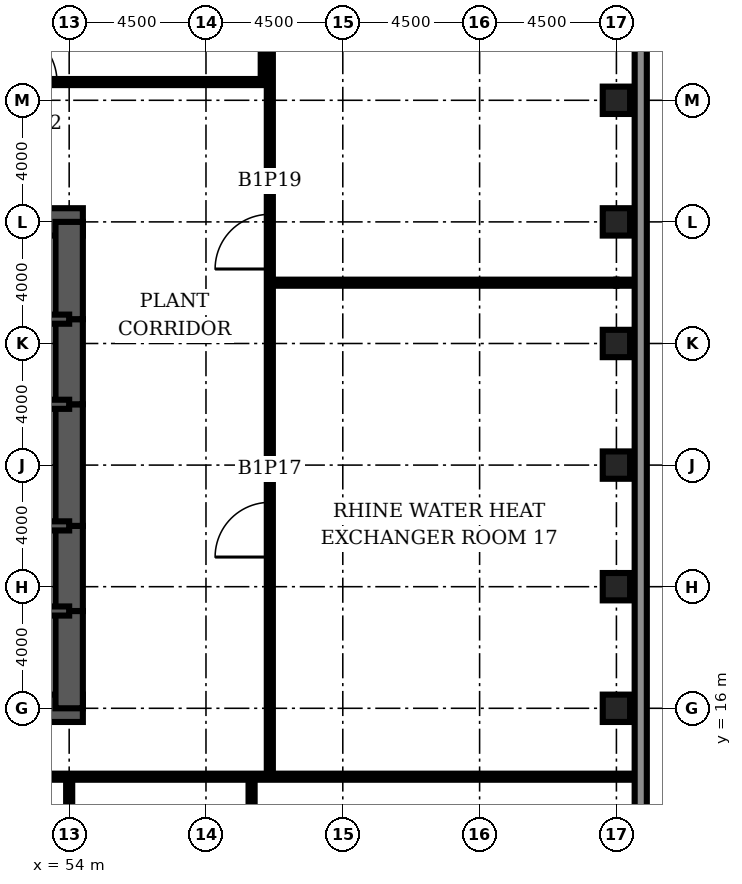
"""IFC4 building model, lengths in metres.
Left out: names, types, materials, properties, quantities, classifications, styles, units other than length and angle.
Written with IfcOpenShell. Run it as: python <this file> out.ifc"""

import sys

from ifc_helpers import new_model, si_unit, direction, frame, frame_2d, origin, origin_2d, place, context, subcontext, project, spatial, rectangle, hollow_rectangle, extrude, element, fill, save


model = new_model("IFC4")
c1 = context("Model", 3, precision=1e-05, world=origin(), true_north=direction((0.0, 1.0)))
c2 = subcontext(c1, "Body", "Model", "MODEL_VIEW")
j1 = project(units=[si_unit("LENGTHUNIT", "METRE"), si_unit("PLANEANGLEUNIT", "RADIAN")], contexts=[c1])
p1 = place(None, origin())
s1 = spatial("IfcSite", under=j1, at=p1, CompositionType="ELEMENT")
p2 = place(p1, origin())
s2 = spatial("IfcBuilding", under=s1, at=p2, CompositionType="ELEMENT")
p3 = place(p2, frame((0.0, 0.0, -6.0)))
s3 = spatial("IfcBuildingStorey", under=s2, at=p3, CompositionType="ELEMENT", Elevation=-6.0)
for number, where, z_axis, x_axis in (
    (1, (72.0, 16.0, 0.0), (0.0, 0.0, 1.0), (1.0, 0.0, 0.0)),
    (2, (72.0, 20.0, 0.0), (0.0, 0.0, 1.0), (1.0, 0.0, 0.0)),
    (3, (72.0, 24.0, 0.0), (0.0, 0.0, 1.0), (1.0, 0.0, 0.0)),
    (4, (72.0, 28.0, 0.0), (0.0, 0.0, 1.0), (1.0, 0.0, 0.0)),
    (5, (72.0, 32.0, 0.0), (0.0, 0.0, 1.0), (1.0, 0.0, 0.0)),
    (6, (72.0, 36.0, 0.0), (0.0, 0.0, 1.0), (1.0, 0.0, 0.0)),
):
    element("IfcColumn", number, at=place(p3, frame(where, z_axis=z_axis, x_axis=x_axis)), inside=s3, PredefinedType="COLUMN", context=c2, shape_type="SweptSolid", body=[
        extrude(hollow_rectangle(XDim=0.9, YDim=0.9, WallThickness=0.12, at=origin_2d()), origin(), (0.0, 0.0, 1.0), 6.0),
    ])
for number, where, z_axis, x_axis in (
    (7, (45.0, 16.0, 0.0), (0.0, 0.0, 1.0), (1.0, 0.0, 0.0)),
    (8, (54.45, 32.0, 0.0), (0.0, 0.0, 1.0), (-1.0, 0.0, 0.0)),
):
    element("IfcWall", number, at=place(p3, frame(where, z_axis=z_axis, x_axis=x_axis)), inside=s3, PredefinedType="SHEAR", context=c2, shape_type="SweptSolid", body=[
        extrude(rectangle(XDim=9.45, YDim=0.9, at=frame_2d((4.725, 0.0))), origin(), (0.0, 0.0, 1.0), 6.0),
    ])
p4 = place(p3, frame((54.0, 16.0, 0.0), z_axis=(0.0, 0.0, 1.0), x_axis=(0.0, 1.0, 0.0)))
e9 = element("IfcWall", 9, at=p4, inside=s3, PredefinedType="SHEAR", context=c2, shape_type="SweptSolid", body=[
    extrude(rectangle(XDim=3.2, YDim=0.9, at=frame_2d((1.6, 0.0))), origin(), (0.0, 0.0, 1.0), 6.0),
])
p5 = place(p3, frame((54.0, 19.2, 0.0), z_axis=(0.0, 0.0, 1.0), x_axis=(0.0, 1.0, 0.0)))
e10 = element("IfcWall", 10, at=p5, inside=s3, PredefinedType="SHEAR", context=c2, shape_type="SweptSolid", body=[
    extrude(rectangle(XDim=2.8, YDim=0.9, at=frame_2d((1.4, 0.0))), origin(), (0.0, 0.0, 1.0), 6.0),
])
p6 = place(p5, frame((0.4, 0.0, 0.0)))
e11 = element("IfcOpeningElement", 11, at=p6, cuts=e10, PredefinedType="OPENING", context=c2, shape_type="SweptSolid", body=[
    extrude(rectangle(XDim=1.8, YDim=2.1, at=frame_2d((0.9, 1.05))), frame((0.0, 0.46, 0.0), z_axis=(0.0, -1.0, 0.0), x_axis=(1.0, 0.0, 0.0)), (0.0, 0.0, 1.0), 0.92),
])
p7 = place(p3, frame((54.0, 22.0, 0.0), z_axis=(0.0, 0.0, 1.0), x_axis=(0.0, 1.0, 0.0)))
e12 = element("IfcWall", 12, at=p7, inside=s3, PredefinedType="SHEAR", context=c2, shape_type="SweptSolid", body=[
    extrude(rectangle(XDim=4.0, YDim=0.9, at=frame_2d((2.0, 0.0))), origin(), (0.0, 0.0, 1.0), 6.0),
])
p8 = place(p3, frame((54.0, 26.0, 0.0), z_axis=(0.0, 0.0, 1.0), x_axis=(0.0, 1.0, 0.0)))
e13 = element("IfcWall", 13, at=p8, inside=s3, PredefinedType="SHEAR", context=c2, shape_type="SweptSolid", body=[
    extrude(rectangle(XDim=2.8, YDim=0.9, at=frame_2d((1.4, 0.0))), origin(), (0.0, 0.0, 1.0), 6.0),
])
p9 = place(p8, frame((0.6, 0.0, 0.0)))
e14 = element("IfcOpeningElement", 14, at=p9, cuts=e13, PredefinedType="OPENING", context=c2, shape_type="SweptSolid", body=[
    extrude(rectangle(XDim=1.8, YDim=2.1, at=frame_2d((0.9, 1.05))), frame((0.0, 0.46, 0.0), z_axis=(0.0, -1.0, 0.0), x_axis=(1.0, 0.0, 0.0)), (0.0, 0.0, 1.0), 0.92),
])
p10 = place(p3, frame((54.0, 28.8, 0.0), z_axis=(0.0, 0.0, 1.0), x_axis=(0.0, 1.0, 0.0)))
e15 = element("IfcWall", 15, at=p10, inside=s3, PredefinedType="SHEAR", context=c2, shape_type="SweptSolid", body=[
    extrude(rectangle(XDim=3.2, YDim=0.9, at=frame_2d((1.6, 0.0))), origin(), (0.0, 0.0, 1.0), 6.0),
])
p11 = place(p3, frame((45.0, 19.2, 0.0), z_axis=(0.0, 0.0, 1.0), x_axis=(1.0, 0.0, 0.0)))
e16 = element("IfcWall", 16, at=p11, inside=s3, PredefinedType="SOLIDWALL", context=c2, shape_type="SweptSolid", body=[
    extrude(rectangle(XDim=9.0, YDim=0.3, at=frame_2d((4.5, 0.0))), origin(), (0.0, 0.0, 1.0), 6.0),
])
p12 = place(p11, frame((7.35, 0.0, 0.0)))
e17 = element("IfcOpeningElement", 17, at=p12, cuts=e16, PredefinedType="OPENING", context=c2, shape_type="SweptSolid", body=[
    extrude(rectangle(XDim=1.0, YDim=2.1, at=frame_2d((0.5, 1.05))), frame((0.0, 0.16, 0.0), z_axis=(0.0, -1.0, 0.0), x_axis=(1.0, 0.0, 0.0)), (0.0, 0.0, 1.0), 0.32),
])
p13 = place(p3, frame((45.0, 28.8, 0.0), z_axis=(0.0, 0.0, 1.0), x_axis=(1.0, 0.0, 0.0)))
e18 = element("IfcWall", 18, at=p13, inside=s3, PredefinedType="SOLIDWALL", context=c2, shape_type="SweptSolid", body=[
    extrude(rectangle(XDim=9.0, YDim=0.3, at=frame_2d((4.5, 0.0))), origin(), (0.0, 0.0, 1.0), 6.0),
])
p14 = place(p13, frame((7.35, 0.0, 0.0)))
e19 = element("IfcOpeningElement", 19, at=p14, cuts=e18, PredefinedType="OPENING", context=c2, shape_type="SweptSolid", body=[
    extrude(rectangle(XDim=1.0, YDim=2.1, at=frame_2d((0.5, 1.05))), frame((0.0, 0.16, 0.0), z_axis=(0.0, -1.0, 0.0), x_axis=(1.0, 0.0, 0.0)), (0.0, 0.0, 1.0), 0.32),
])
p15 = place(p3, frame((48.0, 22.0, 0.0), z_axis=(0.0, 0.0, 1.0), x_axis=(1.0, 0.0, 0.0)))
e20 = element("IfcWall", 20, at=p15, inside=s3, PredefinedType="SOLIDWALL", context=c2, shape_type="SweptSolid", body=[
    extrude(rectangle(XDim=6.0, YDim=0.3, at=frame_2d((3.0, 0.0))), origin(), (0.0, 0.0, 1.0), 6.0),
])
p16 = place(p15, frame((2.0, 0.0, 0.0)))
e21 = element("IfcOpeningElement", 21, at=p16, cuts=e20, PredefinedType="OPENING", context=c2, shape_type="SweptSolid", body=[
    extrude(rectangle(XDim=1.0, YDim=2.1, at=frame_2d((0.5, 1.05))), frame((0.0, 0.16, 0.0), z_axis=(0.0, -1.0, 0.0), x_axis=(1.0, 0.0, 0.0)), (0.0, 0.0, 1.0), 0.32),
])
p17 = place(p15, frame((4.3, 0.0, 0.0)))
e22 = element("IfcOpeningElement", 22, at=p17, cuts=e20, PredefinedType="OPENING", context=c2, shape_type="SweptSolid", body=[
    extrude(rectangle(XDim=1.0, YDim=2.1, at=frame_2d((0.5, 1.05))), frame((0.0, 0.16, 0.0), z_axis=(0.0, -1.0, 0.0), x_axis=(1.0, 0.0, 0.0)), (0.0, 0.0, 1.0), 0.32),
])
p18 = place(p3, frame((48.0, 26.0, 0.0), z_axis=(0.0, 0.0, 1.0), x_axis=(1.0, 0.0, 0.0)))
e23 = element("IfcWall", 23, at=p18, inside=s3, PredefinedType="SOLIDWALL", context=c2, shape_type="SweptSolid", body=[
    extrude(rectangle(XDim=6.0, YDim=0.3, at=frame_2d((3.0, 0.0))), origin(), (0.0, 0.0, 1.0), 6.0),
])
p19 = place(p3, frame((49.5, 13.75, 0.0), z_axis=(0.0, 0.0, 1.0), x_axis=(1.0, 0.0, 0.0)))
e24 = element("IfcWall", 24, at=p19, inside=s3, PredefinedType="PARTITIONING", context=c2, shape_type="SweptSolid", body=[
    extrude(rectangle(XDim=23.09, YDim=0.2, at=frame_2d((11.545, 0.0))), origin(), (0.0, 0.0, 1.0), 5.7),
])
p20 = place(p3, frame((60.6, 30.0, 0.0), z_axis=(0.0, 0.0, 1.0), x_axis=(1.0, 0.0, 0.0)))
e25 = element("IfcWall", 25, at=p20, inside=s3, PredefinedType="PARTITIONING", context=c2, shape_type="SweptSolid", body=[
    extrude(rectangle(XDim=11.4, YDim=0.2, at=frame_2d((5.7, 0.0))), origin(), (0.0, 0.0, 1.0), 4.692),
])
p21 = place(p3, frame((72.0, 30.0, 0.0), z_axis=(0.0, 0.0, 1.0), x_axis=(1.0, 0.0, 0.0)))
e26 = element("IfcWall", 26, at=p21, inside=s3, PredefinedType="PARTITIONING", context=c2, shape_type="SweptSolid", body=[
    extrude(rectangle(XDim=0.59, YDim=0.2, at=frame_2d((0.295, 0.0))), origin(), (0.0, 0.0, 1.0), 5.7),
])
p22 = place(p3, frame((11.6, 36.6, 0.0), z_axis=(0.0, 0.0, 1.0), x_axis=(1.0, 0.0, 0.0)))
e27 = element("IfcWall", 27, at=p22, inside=s3, PredefinedType="PARTITIONING", context=c2, shape_type="SweptSolid", body=[
    extrude(rectangle(XDim=48.8, YDim=0.2, at=frame_2d((24.4, 0.0))), origin(), (0.0, 0.0, 1.0), 5.7),
])
p23 = place(p22, frame((3.425, 0.0, 0.0)))
e28 = element("IfcOpeningElement", 28, at=p23, cuts=e27, PredefinedType="OPENING", context=c2, shape_type="SweptSolid", body=[
    extrude(rectangle(XDim=1.8, YDim=2.1, at=frame_2d((0.9, 1.05))), frame((0.0, 0.11, 0.0), z_axis=(0.0, -1.0, 0.0), x_axis=(1.0, 0.0, 0.0)), (0.0, 0.0, 1.0), 0.22),
])
p24 = place(p22, frame((29.125, 0.0, 0.0)))
e29 = element("IfcOpeningElement", 29, at=p24, cuts=e27, PredefinedType="OPENING", context=c2, shape_type="SweptSolid", body=[
    extrude(rectangle(XDim=1.8, YDim=2.1, at=frame_2d((0.9, 1.05))), frame((0.0, 0.11, 0.0), z_axis=(0.0, -1.0, 0.0), x_axis=(1.0, 0.0, 0.0)), (0.0, 0.0, 1.0), 0.22),
])
p25 = place(p22, frame((40.2, 0.0, 0.0)))
e30 = element("IfcOpeningElement", 30, at=p25, cuts=e27, PredefinedType="OPENING", context=c2, shape_type="SweptSolid", body=[
    extrude(rectangle(XDim=1.8, YDim=2.1, at=frame_2d((0.9, 1.05))), frame((0.0, 0.11, 0.0), z_axis=(0.0, -1.0, 0.0), x_axis=(1.0, 0.0, 0.0)), (0.0, 0.0, 1.0), 0.22),
])
p26 = place(p22, frame((16.75, 0.0, 0.0)))
e31 = element("IfcOpeningElement", 31, at=p26, cuts=e27, PredefinedType="OPENING", context=c2, shape_type="SweptSolid", body=[
    extrude(rectangle(XDim=1.8, YDim=2.1, at=frame_2d((0.9, 1.05))), frame((0.0, 0.11, 0.0), z_axis=(0.0, -1.0, 0.0), x_axis=(1.0, 0.0, 0.0)), (0.0, 0.0, 1.0), 0.22),
])
for number, where, z_axis, x_axis in (
    (32, (54.0, 1.75, 0.0), (0.0, 0.0, 1.0), (0.0, 1.0, 0.0)),
    (33, (60.0, 1.75, 0.0), (0.0, 0.0, 1.0), (0.0, 1.0, 0.0)),
):
    element("IfcWall", number, at=place(p3, frame(where, z_axis=z_axis, x_axis=x_axis)), inside=s3, PredefinedType="PARTITIONING", context=c2, shape_type="SweptSolid", body=[
        extrude(rectangle(XDim=12.0, YDim=0.2, at=frame_2d((6.0, 0.0))), origin(), (0.0, 0.0, 1.0), 5.7),
    ])
p27 = place(p3, frame((60.4, 36.6, 0.0), z_axis=(0.0, 0.0, 1.0), x_axis=(0.0, 1.0, 0.0)))
e34 = element("IfcWall", 34, at=p27, inside=s3, PredefinedType="PARTITIONING", context=c2, shape_type="SweptSolid", body=[
    extrude(rectangle(XDim=9.99, YDim=0.2, at=frame_2d((4.995, 0.0))), origin(), (0.0, 0.0, 1.0), 5.7),
])
p28 = place(p3, frame((60.6, 13.75, 0.0), z_axis=(0.0, 0.0, 1.0), x_axis=(0.0, 1.0, 0.0)))
e35 = element("IfcWall", 35, at=p28, inside=s3, PredefinedType="PARTITIONING", context=c2, shape_type="SweptSolid", body=[
    extrude(rectangle(XDim=32.84, YDim=0.2, at=frame_2d((16.42, 0.0))), origin(), (0.0, 0.0, 1.0), 5.7),
])
p29 = place(p28, frame((7.225, 0.0, 0.0)))
e36 = element("IfcOpeningElement", 36, at=p29, cuts=e35, PredefinedType="OPENING", context=c2, shape_type="SweptSolid", body=[
    extrude(rectangle(XDim=1.8, YDim=2.1, at=frame_2d((0.9, 1.05))), frame((0.0, 0.11, 0.0), z_axis=(0.0, -1.0, 0.0), x_axis=(1.0, 0.0, 0.0)), (0.0, 0.0, 1.0), 0.22),
])
p30 = place(p28, frame((16.7, 0.0, 0.0)))
e37 = element("IfcOpeningElement", 37, at=p30, cuts=e35, PredefinedType="OPENING", context=c2, shape_type="SweptSolid", body=[
    extrude(rectangle(XDim=1.8, YDim=2.1, at=frame_2d((0.9, 1.05))), frame((0.0, 0.11, 0.0), z_axis=(0.0, -1.0, 0.0), x_axis=(1.0, 0.0, 0.0)), (0.0, 0.0, 1.0), 0.22),
])
p31 = place(p3, frame((72.8, -21.3, 0.0), z_axis=(0.0, 0.0, 1.0), x_axis=(0.0, 1.0, 0.0)))
e38 = element("IfcWall", 38, at=p31, inside=s3, PredefinedType="SOLIDWALL", context=c2, shape_type="SweptSolid", body=[
    extrude(rectangle(XDim=67.9, YDim=0.4, at=frame_2d((33.95, 0.0))), origin(), (0.0, 0.0, 1.0), 5.7),
])
p32 = place(p29, origin())
e39 = element("IfcDoor", 39, at=p32, inside=s3, OperationType="SINGLE_SWING_LEFT", PredefinedType="DOOR", context=c2, shape_type="SweptSolid", body=[
    extrude(rectangle(XDim=1.8, YDim=2.1, at=frame_2d((0.9, 1.05))), frame((0.0, 0.025, 0.0), z_axis=(0.0, -1.0, 0.0), x_axis=(1.0, 0.0, 0.0)), (0.0, 0.0, 1.0), 0.05),
])
fill(e36, e39)
p33 = place(p30, origin())
e40 = element("IfcDoor", 40, at=p33, inside=s3, OperationType="SINGLE_SWING_LEFT", PredefinedType="DOOR", context=c2, shape_type="SweptSolid", body=[
    extrude(rectangle(XDim=1.8, YDim=2.1, at=frame_2d((0.9, 1.05))), frame((0.0, 0.025, 0.0), z_axis=(0.0, -1.0, 0.0), x_axis=(1.0, 0.0, 0.0)), (0.0, 0.0, 1.0), 0.05),
])
fill(e37, e40)
p34 = place(p25, origin())
e41 = element("IfcDoor", 41, at=p34, inside=s3, OperationType="SINGLE_SWING_LEFT", PredefinedType="DOOR", context=c2, shape_type="SweptSolid", body=[
    extrude(rectangle(XDim=1.8, YDim=2.1, at=frame_2d((0.9, 1.05))), frame((0.0, 0.025, 0.0), z_axis=(0.0, -1.0, 0.0), x_axis=(1.0, 0.0, 0.0)), (0.0, 0.0, 1.0), 0.05),
])
fill(e30, e41)
p35 = place(p6, origin())
e42 = element("IfcDoor", 42, at=p35, inside=s3, OperationType="SINGLE_SWING_LEFT", PredefinedType="DOOR", context=c2, shape_type="SweptSolid", body=[
    extrude(rectangle(XDim=1.8, YDim=2.1, at=frame_2d((0.9, 1.05))), frame((0.0, 0.45, 0.0), z_axis=(0.0, -1.0, 0.0), x_axis=(1.0, 0.0, 0.0)), (0.0, 0.0, 1.0), 0.899),
])
fill(e11, e42)
p36 = place(p9, origin())
e43 = element("IfcDoor", 43, at=p36, inside=s3, OperationType="SINGLE_SWING_LEFT", PredefinedType="DOOR", context=c2, shape_type="SweptSolid", body=[
    extrude(rectangle(XDim=1.8, YDim=2.1, at=frame_2d((0.9, 1.05))), frame((0.0, 0.45, 0.0), z_axis=(0.0, -1.0, 0.0), x_axis=(1.0, 0.0, 0.0)), (0.0, 0.0, 1.0), 0.899),
])
fill(e14, e43)
save(model, sys.argv[1])
